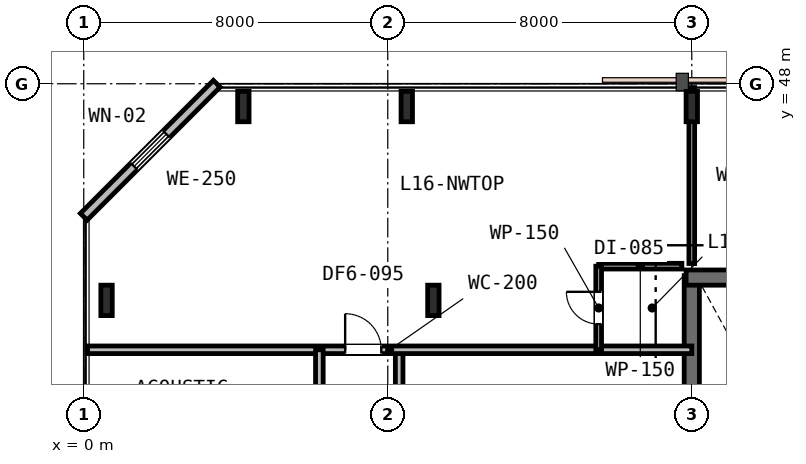
"""IFC4 building model, lengths in metres.
Left out: names, types, materials, properties, quantities, classifications, styles, units other than length and angle.
Written with IfcOpenShell. Run it as: python <this file> out.ifc"""

import sys

from ifc_helpers import new_model, si_unit, direction, frame, frame_2d, origin, origin_2d, place, context, subcontext, project, spatial, rectangle, i_section, extrude, element, fill, save


model = new_model("IFC4")
c1 = context("Model", 3, precision=1e-05, world=origin(), true_north=direction((0.0, 1.0)))
c2 = subcontext(c1, "Body", "Model", "MODEL_VIEW")
j1 = project(units=[si_unit("LENGTHUNIT", "METRE"), si_unit("PLANEANGLEUNIT", "RADIAN")], contexts=[c1])
p1 = place(None, origin())
s1 = spatial("IfcSite", under=j1, at=p1, CompositionType="ELEMENT")
p2 = place(p1, origin())
s2 = spatial("IfcBuilding", under=s1, at=p2, CompositionType="ELEMENT")
p3 = place(p2, frame((0.0, 0.0, 65.4)))
s3 = spatial("IfcBuildingStorey", under=s2, at=p3, CompositionType="ELEMENT", Elevation=65.4)
p4 = place(p3, frame((16.0, 30.65, 0.0), z_axis=(0.0, 0.0, 1.0), x_axis=(0.0, 1.0, 0.0)))
e1 = element("IfcWall", 1, at=p4, inside=s3, PredefinedType="SHEAR", context=c2, shape_type="SweptSolid", body=[
    extrude(rectangle(XDim=12.3, YDim=0.4, at=frame_2d((6.15, 0.0))), origin(), (0.0, 0.0, 1.0), 3.6),
])
p5 = place(p3, frame((15.85, 42.9, 0.0), z_axis=(0.0, 0.0, 1.0), x_axis=(1.0, 0.0, 0.0)))
e2 = element("IfcWall", 2, at=p5, inside=s3, PredefinedType="SHEAR", context=c2, shape_type="SweptSolid", body=[
    extrude(rectangle(XDim=24.3, YDim=0.4, at=frame_2d((12.15, 0.0))), origin(), (0.0, 0.0, 1.0), 3.6),
])
for number, where, z_axis, x_axis in (
    (3, (9.2, 42.3, 0.0), (0.0, 0.0, 1.0), (1.0, 0.0, 0.0)),
    (4, (0.6, 42.3, 0.0), (0.0, 0.0, 1.0), (1.0, 0.0, 0.0)),
    (5, (4.2, 47.4, 0.0), (0.0, 0.0, 1.0), (1.0, 0.0, 0.0)),
    (6, (8.5, 47.4, 0.0), (0.0, 0.0, 1.0), (1.0, 0.0, 0.0)),
    (7, (16.0, 47.4, 0.0), (0.0, 0.0, 1.0), (1.0, 0.0, 0.0)),
):
    element("IfcColumn", number, at=place(p3, frame(where, z_axis=z_axis, x_axis=x_axis)), inside=s3, PredefinedType="COLUMN", context=c2, shape_type="SweptSolid", body=[
        extrude(i_section(OverallWidth=0.3, OverallDepth=0.8, WebThickness=0.018, FlangeThickness=0.033, FilletRadius=0.03, at=origin_2d()), origin(), (0.0, 0.0, 1.0), 3.6),
    ])
p6 = place(p3, frame((3.5, 48.0, 0.0), z_axis=(0.0, 0.0, 1.0), x_axis=(-0.707106781187, -0.707106781187, 0.0)))
e8 = element("IfcWall", 8, at=p6, inside=s3, PredefinedType="STANDARD", context=c2, shape_type="SweptSolid", body=[
    extrude(rectangle(XDim=4.95, YDim=0.25, at=frame_2d((2.475, 0.0))), origin(), (0.0, 0.0, 1.0), 3.33),
])
p7 = place(p6, frame((1.875, 0.0, 0.85)))
e9 = element("IfcOpeningElement", 9, at=p7, cuts=e8, PredefinedType="OPENING", context=c2, shape_type="SweptSolid", body=[
    extrude(rectangle(XDim=1.2, YDim=1.6, at=frame_2d((0.6, 0.8))), frame((0.0, 0.135, 0.0), z_axis=(0.0, -1.0, 0.0), x_axis=(1.0, 0.0, 0.0)), (0.0, 0.0, 1.0), 0.27),
])
p8 = place(p3, frame((8.3, 30.8, 0.0), z_axis=(0.0, 0.0, 1.0), x_axis=(0.0, 1.0, 0.0)))
e10 = element("IfcWall", 10, at=p8, inside=s3, PredefinedType="PARTITIONING", context=c2, shape_type="SweptSolid", body=[
    extrude(rectangle(XDim=10.2, YDim=0.2, at=frame_2d((5.1, 0.0))), origin(), (0.0, 0.0, 1.0), 2.83),
])
p9 = place(p8, frame((1.95, 0.0, 0.0)))
e11 = element("IfcOpeningElement", 11, at=p9, cuts=e10, PredefinedType="OPENING", context=c2, shape_type="SweptSolid", body=[
    extrude(rectangle(XDim=0.9, YDim=2.15, at=frame_2d((0.45, 1.075))), frame((0.0, 0.11, 0.0), z_axis=(0.0, -1.0, 0.0), x_axis=(1.0, 0.0, 0.0)), (0.0, 0.0, 1.0), 0.22),
])
p10 = place(p8, frame((7.025, 0.0, 0.0)))
e12 = element("IfcOpeningElement", 12, at=p10, cuts=e10, PredefinedType="OPENING", context=c2, shape_type="SweptSolid", body=[
    extrude(rectangle(XDim=0.95, YDim=2.15, at=frame_2d((0.475, 1.075))), frame((0.0, 0.11, 0.0), z_axis=(0.0, -1.0, 0.0), x_axis=(1.0, 0.0, 0.0)), (0.0, 0.0, 1.0), 0.22),
])
p11 = place(p3, frame((0.1, 41.0, 0.0), z_axis=(0.0, 0.0, 1.0), x_axis=(1.0, 0.0, 0.0)))
e13 = element("IfcWall", 13, at=p11, inside=s3, PredefinedType="PARTITIONING", context=c2, shape_type="SweptSolid", body=[
    extrude(rectangle(XDim=15.9, YDim=0.2, at=frame_2d((7.95, 0.0))), origin(), (0.0, 0.0, 1.0), 2.83),
])
p12 = place(p11, frame((6.779, 0.0, 0.0)))
e14 = element("IfcOpeningElement", 14, at=p12, cuts=e13, PredefinedType="OPENING", context=c2, shape_type="SweptSolid", body=[
    extrude(rectangle(XDim=0.95, YDim=2.15, at=frame_2d((0.475, 1.075))), frame((0.0, 0.11, 0.0), z_axis=(0.0, -1.0, 0.0), x_axis=(1.0, 0.0, 0.0)), (0.0, 0.0, 1.0), 0.22),
])
p13 = place(p3, frame((13.55, 43.2, 0.0), z_axis=(0.0, 0.0, 1.0), x_axis=(1.0, 0.0, 0.0)))
e15 = element("IfcWall", 15, at=p13, inside=s3, PredefinedType="PARTITIONING", context=c2, shape_type="SweptSolid", body=[
    extrude(rectangle(XDim=2.19, YDim=0.15, at=frame_2d((1.095, 0.0))), origin(), (0.0, 0.0, 1.0), 3.33),
])
p14 = place(p3, frame((13.55, 41.0, 0.0), z_axis=(0.0, 0.0, 1.0), x_axis=(0.0, 1.0, 0.0)))
e16 = element("IfcWall", 16, at=p14, inside=s3, PredefinedType="PARTITIONING", context=c2, shape_type="SweptSolid", body=[
    extrude(rectangle(XDim=2.2, YDim=0.15, at=frame_2d((1.1, 0.0))), origin(), (0.0, 0.0, 1.0), 3.33),
])
p15 = place(p14, frame((0.675, 0.0, 0.0)))
e17 = element("IfcOpeningElement", 17, at=p15, cuts=e16, PredefinedType="OPENING", context=c2, shape_type="SweptSolid", body=[
    extrude(rectangle(XDim=0.85, YDim=2.15, at=frame_2d((0.425, 1.075))), frame((0.0, 0.085, 0.0), z_axis=(0.0, -1.0, 0.0), x_axis=(1.0, 0.0, 0.0)), (0.0, 0.0, 1.0), 0.17),
])
p16 = place(p3, frame((6.2, 28.6, 0.0), z_axis=(0.0, 0.0, 1.0), x_axis=(0.0, 1.0, 0.0)))
e18 = element("IfcWall", 18, at=p16, inside=s3, PredefinedType="PARTITIONING", context=c2, shape_type="SweptSolid", body=[
    extrude(rectangle(XDim=12.4, YDim=0.2, at=frame_2d((6.2, 0.0))), origin(), (0.0, 0.0, 1.0), 2.83),
])
p17 = place(p16, frame((3.182, 0.0, 0.0)))
e19 = element("IfcOpeningElement", 19, at=p17, cuts=e18, PredefinedType="OPENING", context=c2, shape_type="SweptSolid", body=[
    extrude(rectangle(XDim=0.95, YDim=2.15, at=frame_2d((0.475, 1.075))), frame((0.0, 0.11, 0.0), z_axis=(0.0, -1.0, 0.0), x_axis=(1.0, 0.0, 0.0)), (0.0, 0.0, 1.0), 0.22),
])
p18 = place(p16, frame((6.075, 0.0, 0.0)))
e20 = element("IfcOpeningElement", 20, at=p18, cuts=e18, PredefinedType="OPENING", context=c2, shape_type="SweptSolid", body=[
    extrude(rectangle(XDim=0.95, YDim=2.15, at=frame_2d((0.475, 1.075))), frame((0.0, 0.11, 0.0), z_axis=(0.0, -1.0, 0.0), x_axis=(1.0, 0.0, 0.0)), (0.0, 0.0, 1.0), 0.22),
])
p19 = place(p16, frame((8.966, 0.0, 0.0)))
e21 = element("IfcOpeningElement", 21, at=p19, cuts=e18, PredefinedType="OPENING", context=c2, shape_type="SweptSolid", body=[
    extrude(rectangle(XDim=0.95, YDim=2.15, at=frame_2d((0.475, 1.075))), frame((0.0, 0.11, 0.0), z_axis=(0.0, -1.0, 0.0), x_axis=(1.0, 0.0, 0.0)), (0.0, 0.0, 1.0), 0.22),
])
p20 = place(p3, frame((16.0, 43.27, 0.0), z_axis=(0.0, 0.0, 1.0), x_axis=(0.0, 1.0, 0.0)))
e22 = element("IfcWall", 22, at=p20, inside=s3, PredefinedType="PARTITIONING", context=c2, shape_type="SweptSolid", body=[
    extrude(rectangle(XDim=4.63, YDim=0.15, at=frame_2d((2.315, 0.0))), origin(), (0.0, 0.0, 1.0), 2.92),
])
p21 = place(p7, origin())
e23 = element("IfcWindow", 23, at=p21, inside=s3, PartitioningType="SINGLE_PANEL", PredefinedType="WINDOW", context=c2, shape_type="SweptSolid", body=[
    extrude(rectangle(XDim=1.2, YDim=1.6, at=frame_2d((0.6, 0.8))), frame((0.0, 0.03, 0.0), z_axis=(0.0, -1.0, 0.0), x_axis=(1.0, 0.0, 0.0)), (0.0, 0.0, 1.0), 0.06),
])
fill(e9, e23)
p22 = place(p12, origin())
e24 = element("IfcDoor", 24, at=p22, inside=s3, OperationType="SINGLE_SWING_LEFT", PredefinedType="DOOR", context=c2, shape_type="SweptSolid", body=[
    extrude(rectangle(XDim=0.95, YDim=2.15, at=frame_2d((0.475, 1.075))), frame((0.0, 0.025, 0.0), z_axis=(0.0, -1.0, 0.0), x_axis=(1.0, 0.0, 0.0)), (0.0, 0.0, 1.0), 0.05),
])
fill(e14, e24)
p23 = place(p15, origin())
e25 = element("IfcDoor", 25, at=p23, inside=s3, OperationType="SINGLE_SWING_RIGHT", PredefinedType="DOOR", context=c2, shape_type="SweptSolid", body=[
    extrude(rectangle(XDim=0.85, YDim=2.15, at=frame_2d((0.425, 1.075))), frame((0.0, 0.025, 0.0), z_axis=(0.0, -1.0, 0.0), x_axis=(1.0, 0.0, 0.0)), (0.0, 0.0, 1.0), 0.05),
])
fill(e17, e25)
save(model, sys.argv[1])
